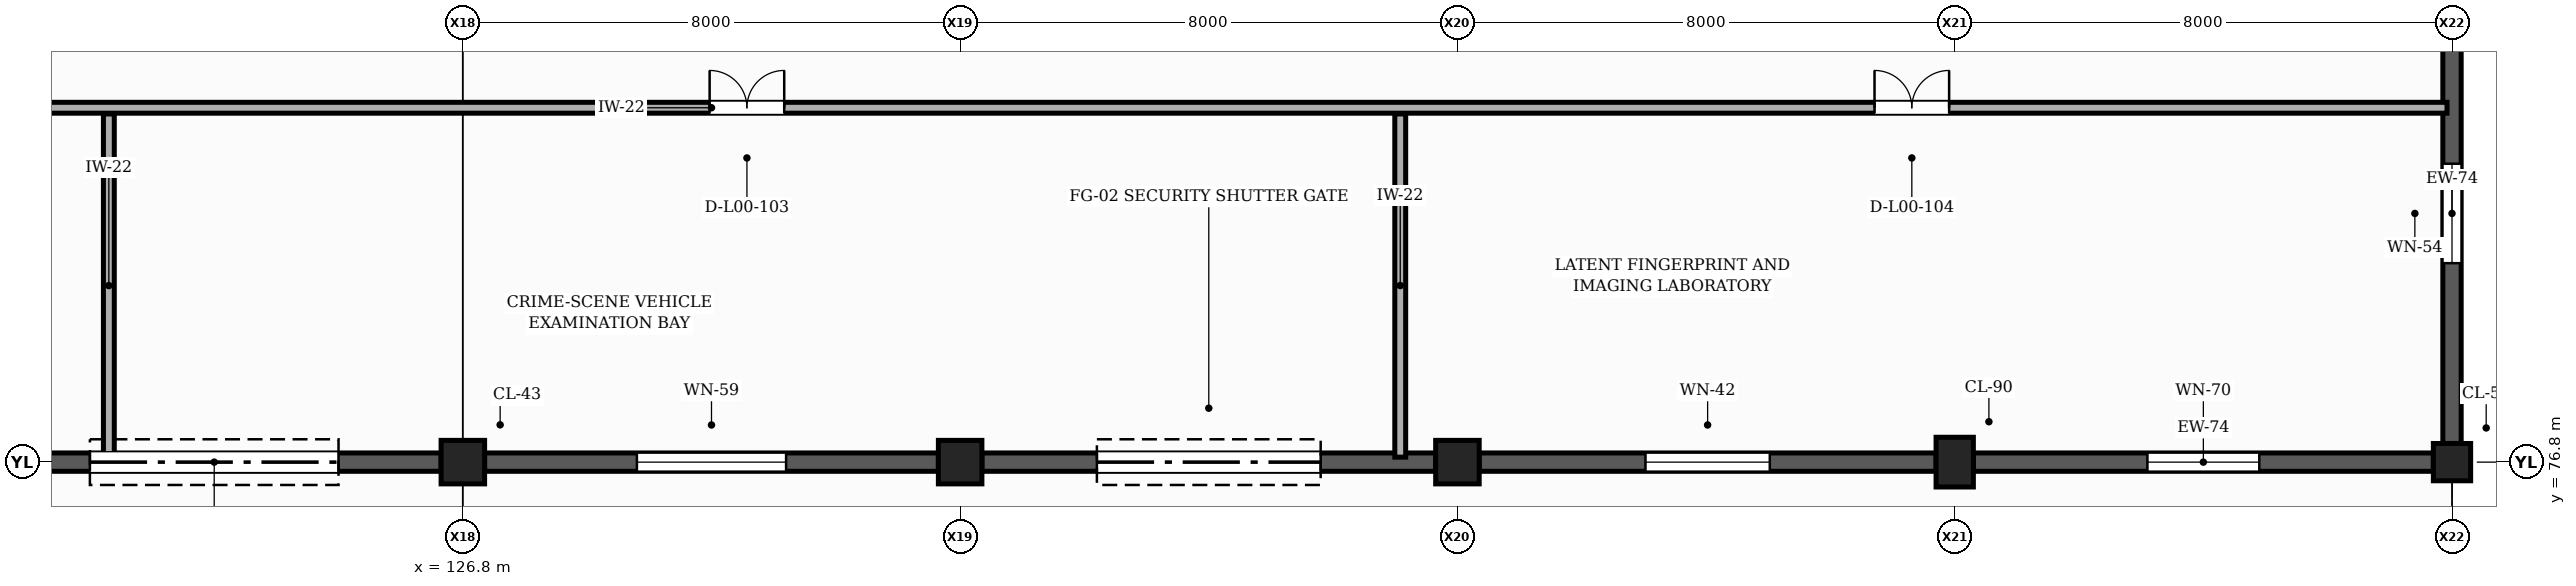
"""IFC4 building model, lengths in metres.
Left out: names, types, materials, properties, quantities, classifications, styles, units other than length and angle.
Written with IfcOpenShell. Run it as: python <this file> out.ifc"""

import sys

from ifc_helpers import new_model, si_unit, direction, frame, frame_2d, origin, origin_2d, place, context, subcontext, project, spatial, rectangle, extrude, element, fill, save


model = new_model("IFC4")
c1 = context("Model", 3, precision=1e-05, world=origin(), true_north=direction((0.0, 1.0)))
c2 = subcontext(c1, "Body", "Model", "MODEL_VIEW")
j1 = project(units=[si_unit("LENGTHUNIT", "METRE"), si_unit("PLANEANGLEUNIT", "RADIAN")], contexts=[c1])
p1 = place(None, origin())
s1 = spatial("IfcSite", under=j1, at=p1, CompositionType="ELEMENT")
p2 = place(p1, origin())
s2 = spatial("IfcBuilding", under=s1, at=p2, CompositionType="ELEMENT")
p3 = place(p2, origin())
s3 = spatial("IfcBuildingStorey", under=s2, at=p3, CompositionType="ELEMENT", Elevation=0.0)
for number, where, z_axis, x_axis in (
    (1, (126.8, 76.8, 0.0), (0.0, 0.0, 1.0), (1.0, 0.0, 0.0)),
    (2, (134.8, 76.8, 0.0), (0.0, 0.0, 1.0), (1.0, 0.0, 0.0)),
    (3, (142.8, 76.8, 0.0), (0.0, 0.0, 1.0), (1.0, 0.0, 0.0)),
):
    element("IfcColumn", number, at=place(p3, frame(where, z_axis=z_axis, x_axis=x_axis)), inside=s3, PredefinedType="COLUMN", context=c2, shape_type="SweptSolid", body=[
        extrude(rectangle(XDim=0.7, YDim=0.7, at=origin_2d()), origin(), (0.0, 0.0, 1.0), 4.8),
    ])
p4 = place(p3, frame((150.8, 76.8, 0.0), z_axis=(0.0, 0.0, 1.0), x_axis=(1.0, 0.0, 0.0)))
e4 = element("IfcColumn", 4, at=p4, inside=s3, PredefinedType="COLUMN", context=c2, shape_type="SweptSolid", body=[
    extrude(rectangle(XDim=0.6, YDim=0.8, at=origin_2d()), origin(), (0.0, 0.0, 1.0), 4.8),
])
p5 = place(p3, frame((158.8, 76.8, 0.0), z_axis=(0.0, 0.0, 1.0), x_axis=(1.0, 0.0, 0.0)))
e5 = element("IfcColumn", 5, at=p5, inside=s3, PredefinedType="COLUMN", context=c2, shape_type="SweptSolid", body=[
    extrude(rectangle(XDim=0.6, YDim=0.6, at=origin_2d()), origin(), (0.0, 0.0, 1.0), 4.8),
])
p6 = place(p3, frame((119.15, 76.8, -0.42), z_axis=(0.0, 0.0, 1.0), x_axis=(1.0, 0.0, 0.0)))
e6 = element("IfcWall", 6, at=p6, inside=s3, PredefinedType="SOLIDWALL", context=c2, shape_type="SweptSolid", body=[
    extrude(rectangle(XDim=7.3, YDim=0.295, at=frame_2d((3.65, 0.0))), origin(), (0.0, 0.0, 1.0), 4.2),
])
p7 = place(p6, frame((1.65, 0.0, 0.42)))
e7 = element("IfcOpeningElement", 7, at=p7, cuts=e6, PredefinedType="OPENING", context=c2, shape_type="SweptSolid", body=[
    extrude(rectangle(XDim=4.0, YDim=3.0, at=frame_2d((2.0, 1.5))), frame((0.0, 0.157, 0.0), z_axis=(0.0, -1.0, 0.0), x_axis=(1.0, 0.0, 0.0)), (0.0, 0.0, 1.0), 0.315),
])
p8 = place(p3, frame((127.15, 76.8, -0.42), z_axis=(0.0, 0.0, 1.0), x_axis=(1.0, 0.0, 0.0)))
e8 = element("IfcWall", 8, at=p8, inside=s3, PredefinedType="SOLIDWALL", context=c2, shape_type="SweptSolid", body=[
    extrude(rectangle(XDim=7.3, YDim=0.295, at=frame_2d((3.65, 0.0))), origin(), (0.0, 0.0, 1.0), 4.2),
])
p9 = place(p8, frame((2.45, 0.0, 1.32)))
e9 = element("IfcOpeningElement", 9, at=p9, cuts=e8, PredefinedType="OPENING", context=c2, shape_type="SweptSolid", body=[
    extrude(rectangle(XDim=2.4, YDim=1.5, at=frame_2d((1.2, 0.75))), frame((0.0, 0.157, 0.0), z_axis=(0.0, -1.0, 0.0), x_axis=(1.0, 0.0, 0.0)), (0.0, 0.0, 1.0), 0.315),
])
p10 = place(p3, frame((135.15, 76.8, -0.42), z_axis=(0.0, 0.0, 1.0), x_axis=(1.0, 0.0, 0.0)))
e10 = element("IfcWall", 10, at=p10, inside=s3, PredefinedType="SOLIDWALL", context=c2, shape_type="SweptSolid", body=[
    extrude(rectangle(XDim=7.3, YDim=0.295, at=frame_2d((3.65, 0.0))), origin(), (0.0, 0.0, 1.0), 4.2),
])
p11 = place(p10, frame((1.85, 0.0, 0.42)))
e11 = element("IfcOpeningElement", 11, at=p11, cuts=e10, PredefinedType="OPENING", context=c2, shape_type="SweptSolid", body=[
    extrude(rectangle(XDim=3.6, YDim=2.9, at=frame_2d((1.8, 1.45))), frame((0.0, 0.157, 0.0), z_axis=(0.0, -1.0, 0.0), x_axis=(1.0, 0.0, 0.0)), (0.0, 0.0, 1.0), 0.315),
])
p12 = place(p3, frame((143.15, 76.8, -0.42), z_axis=(0.0, 0.0, 1.0), x_axis=(1.0, 0.0, 0.0)))
e12 = element("IfcWall", 12, at=p12, inside=s3, PredefinedType="SOLIDWALL", context=c2, shape_type="SweptSolid", body=[
    extrude(rectangle(XDim=7.35, YDim=0.295, at=frame_2d((3.675, 0.0))), origin(), (0.0, 0.0, 1.0), 4.2),
])
p13 = place(p12, frame((2.675, 0.0, 1.32)))
e13 = element("IfcOpeningElement", 13, at=p13, cuts=e12, PredefinedType="OPENING", context=c2, shape_type="SweptSolid", body=[
    extrude(rectangle(XDim=2.0, YDim=1.5, at=frame_2d((1.0, 0.75))), frame((0.0, 0.157, 0.0), z_axis=(0.0, -1.0, 0.0), x_axis=(1.0, 0.0, 0.0)), (0.0, 0.0, 1.0), 0.315),
])
p14 = place(p3, frame((151.1, 76.8, -0.42), z_axis=(0.0, 0.0, 1.0), x_axis=(1.0, 0.0, 0.0)))
e14 = element("IfcWall", 14, at=p14, inside=s3, PredefinedType="SOLIDWALL", context=c2, shape_type="SweptSolid", body=[
    extrude(rectangle(XDim=7.4, YDim=0.295, at=frame_2d((3.7, 0.0))), origin(), (0.0, 0.0, 1.0), 4.2),
])
p15 = place(p14, frame((2.8, 0.0, 1.32)))
e15 = element("IfcOpeningElement", 15, at=p15, cuts=e14, PredefinedType="OPENING", context=c2, shape_type="SweptSolid", body=[
    extrude(rectangle(XDim=1.8, YDim=1.4, at=frame_2d((0.9, 0.7))), frame((0.0, 0.157, 0.0), z_axis=(0.0, -1.0, 0.0), x_axis=(1.0, 0.0, 0.0)), (0.0, 0.0, 1.0), 0.315),
])
p16 = place(p3, frame((158.8, 77.1, -0.42), z_axis=(0.0, 0.0, 1.0), x_axis=(0.0, 1.0, 0.0)))
e16 = element("IfcWall", 16, at=p16, inside=s3, PredefinedType="SOLIDWALL", context=c2, shape_type="SweptSolid", body=[
    extrude(rectangle(XDim=7.4, YDim=0.295, at=frame_2d((3.7, 0.0))), origin(), (0.0, 0.0, 1.0), 4.3),
])
p17 = place(p16, frame((2.9, 0.0, 1.32)))
e17 = element("IfcOpeningElement", 17, at=p17, cuts=e16, PredefinedType="OPENING", context=c2, shape_type="SweptSolid", body=[
    extrude(rectangle(XDim=1.6, YDim=2.1, at=frame_2d((0.8, 1.05))), frame((0.0, 0.157, 0.0), z_axis=(0.0, -1.0, 0.0), x_axis=(1.0, 0.0, 0.0)), (0.0, 0.0, 1.0), 0.315),
])
for number, where, z_axis, x_axis in (
    (18, (121.105, 76.88, 0.0), (0.0, 0.0, 1.0), (0.0, 1.0, 0.0)),
    (19, (141.88, 76.88, 0.0), (0.0, 0.0, 1.0), (0.0, 1.0, 0.0)),
):
    element("IfcWall", number, at=place(p3, frame(where, z_axis=z_axis, x_axis=x_axis)), inside=s3, PredefinedType="PARTITIONING", context=c2, shape_type="SweptSolid", body=[
        extrude(rectangle(XDim=5.52, YDim=0.175, at=frame_2d((2.76, 0.0))), origin(), (0.0, 0.0, 1.0), 3.765),
    ])
p18 = place(p3, frame((102.88, 82.5, 0.0), z_axis=(0.0, 0.0, 1.0), x_axis=(1.0, 0.0, 0.0)))
e20 = element("IfcWall", 20, at=p18, inside=s3, PredefinedType="PARTITIONING", context=c2, shape_type="SweptSolid", body=[
    extrude(rectangle(XDim=55.84, YDim=0.175, at=frame_2d((27.92, 0.0))), origin(), (0.0, 0.0, 1.0), 3.765),
])
p19 = place(p18, frame((8.46, 0.0, 0.0)))
e21 = element("IfcOpeningElement", 21, at=p19, cuts=e20, PredefinedType="OPENING", context=c2, shape_type="SweptSolid", body=[
    extrude(rectangle(XDim=1.2, YDim=2.2, at=frame_2d((0.6, 1.1))), frame((0.0, 0.098, 0.0), z_axis=(0.0, -1.0, 0.0), x_axis=(1.0, 0.0, 0.0)), (0.0, 0.0, 1.0), 0.195),
])
p20 = place(p18, frame((27.89, 0.0, 0.0)))
e22 = element("IfcOpeningElement", 22, at=p20, cuts=e20, PredefinedType="OPENING", context=c2, shape_type="SweptSolid", body=[
    extrude(rectangle(XDim=1.2, YDim=2.2, at=frame_2d((0.6, 1.1))), frame((0.0, 0.098, 0.0), z_axis=(0.0, -1.0, 0.0), x_axis=(1.0, 0.0, 0.0)), (0.0, 0.0, 1.0), 0.195),
])
p21 = place(p18, frame((46.63, 0.0, 0.0)))
e23 = element("IfcOpeningElement", 23, at=p21, cuts=e20, PredefinedType="OPENING", context=c2, shape_type="SweptSolid", body=[
    extrude(rectangle(XDim=1.2, YDim=2.2, at=frame_2d((0.6, 1.1))), frame((0.0, 0.098, 0.0), z_axis=(0.0, -1.0, 0.0), x_axis=(1.0, 0.0, 0.0)), (0.0, 0.0, 1.0), 0.195),
])
p22 = place(p7, frame((4.0, 0.0, 0.0), z_axis=(0.0, 0.0, 1.0), x_axis=(-1.0, 0.0, 0.0)))
e24 = element("IfcDoor", 24, at=p22, inside=s3, OperationType="ROLLINGUP", PredefinedType="GATE", context=c2, shape_type="SweptSolid", body=[
    extrude(rectangle(XDim=4.0, YDim=3.0, at=frame_2d((2.0, 1.5))), frame((0.0, 0.025, 0.0), z_axis=(0.0, -1.0, 0.0), x_axis=(1.0, 0.0, 0.0)), (0.0, 0.0, 1.0), 0.05),
])
fill(e7, e24)
p23 = place(p11, frame((3.6, 0.0, 0.0), z_axis=(0.0, 0.0, 1.0), x_axis=(-1.0, 0.0, 0.0)))
e25 = element("IfcDoor", 25, at=p23, inside=s3, OperationType="ROLLINGUP", PredefinedType="GATE", context=c2, shape_type="SweptSolid", body=[
    extrude(rectangle(XDim=3.6, YDim=2.9, at=frame_2d((1.8, 1.45))), frame((0.0, 0.025, 0.0), z_axis=(0.0, -1.0, 0.0), x_axis=(1.0, 0.0, 0.0)), (0.0, 0.0, 1.0), 0.05),
])
fill(e11, e25)
p24 = place(p9, origin())
e26 = element("IfcWindow", 26, at=p24, inside=s3, PartitioningType="SINGLE_PANEL", PredefinedType="WINDOW", context=c2, shape_type="SweptSolid", body=[
    extrude(rectangle(XDim=2.4, YDim=1.5, at=frame_2d((1.2, 0.75))), frame((0.0, 0.03, 0.0), z_axis=(0.0, -1.0, 0.0), x_axis=(1.0, 0.0, 0.0)), (0.0, 0.0, 1.0), 0.06),
])
fill(e9, e26)
p25 = place(p13, origin())
e27 = element("IfcWindow", 27, at=p25, inside=s3, PartitioningType="SINGLE_PANEL", PredefinedType="WINDOW", context=c2, shape_type="SweptSolid", body=[
    extrude(rectangle(XDim=2.0, YDim=1.5, at=frame_2d((1.0, 0.75))), frame((0.0, 0.03, 0.0), z_axis=(0.0, -1.0, 0.0), x_axis=(1.0, 0.0, 0.0)), (0.0, 0.0, 1.0), 0.06),
])
fill(e13, e27)
p26 = place(p15, origin())
e28 = element("IfcWindow", 28, at=p26, inside=s3, PartitioningType="SINGLE_PANEL", PredefinedType="WINDOW", context=c2, shape_type="SweptSolid", body=[
    extrude(rectangle(XDim=1.8, YDim=1.4, at=frame_2d((0.9, 0.7))), frame((0.0, 0.03, 0.0), z_axis=(0.0, -1.0, 0.0), x_axis=(1.0, 0.0, 0.0)), (0.0, 0.0, 1.0), 0.06),
])
fill(e15, e28)
p27 = place(p17, origin())
e29 = element("IfcWindow", 29, at=p27, inside=s3, PartitioningType="SINGLE_PANEL", PredefinedType="WINDOW", context=c2, shape_type="SweptSolid", body=[
    extrude(rectangle(XDim=1.6, YDim=2.1, at=frame_2d((0.8, 1.05))), frame((0.0, 0.03, 0.0), z_axis=(0.0, -1.0, 0.0), x_axis=(1.0, 0.0, 0.0)), (0.0, 0.0, 1.0), 0.06),
])
fill(e17, e29)
p28 = place(p20, origin())
e30 = element("IfcDoor", 30, at=p28, inside=s3, OperationType="DOUBLE_DOOR_SINGLE_SWING", PredefinedType="DOOR", context=c2, shape_type="SweptSolid", body=[
    extrude(rectangle(XDim=1.2, YDim=2.2, at=frame_2d((0.6, 1.1))), frame((0.0, 0.025, 0.0), z_axis=(0.0, -1.0, 0.0), x_axis=(1.0, 0.0, 0.0)), (0.0, 0.0, 1.0), 0.05),
])
fill(e22, e30)
p29 = place(p21, origin())
e31 = element("IfcDoor", 31, at=p29, inside=s3, OperationType="DOUBLE_DOOR_SINGLE_SWING", PredefinedType="DOOR", context=c2, shape_type="SweptSolid", body=[
    extrude(rectangle(XDim=1.2, YDim=2.2, at=frame_2d((0.6, 1.1))), frame((0.0, 0.025, 0.0), z_axis=(0.0, -1.0, 0.0), x_axis=(1.0, 0.0, 0.0)), (0.0, 0.0, 1.0), 0.05),
])
fill(e23, e31)
save(model, sys.argv[1])
